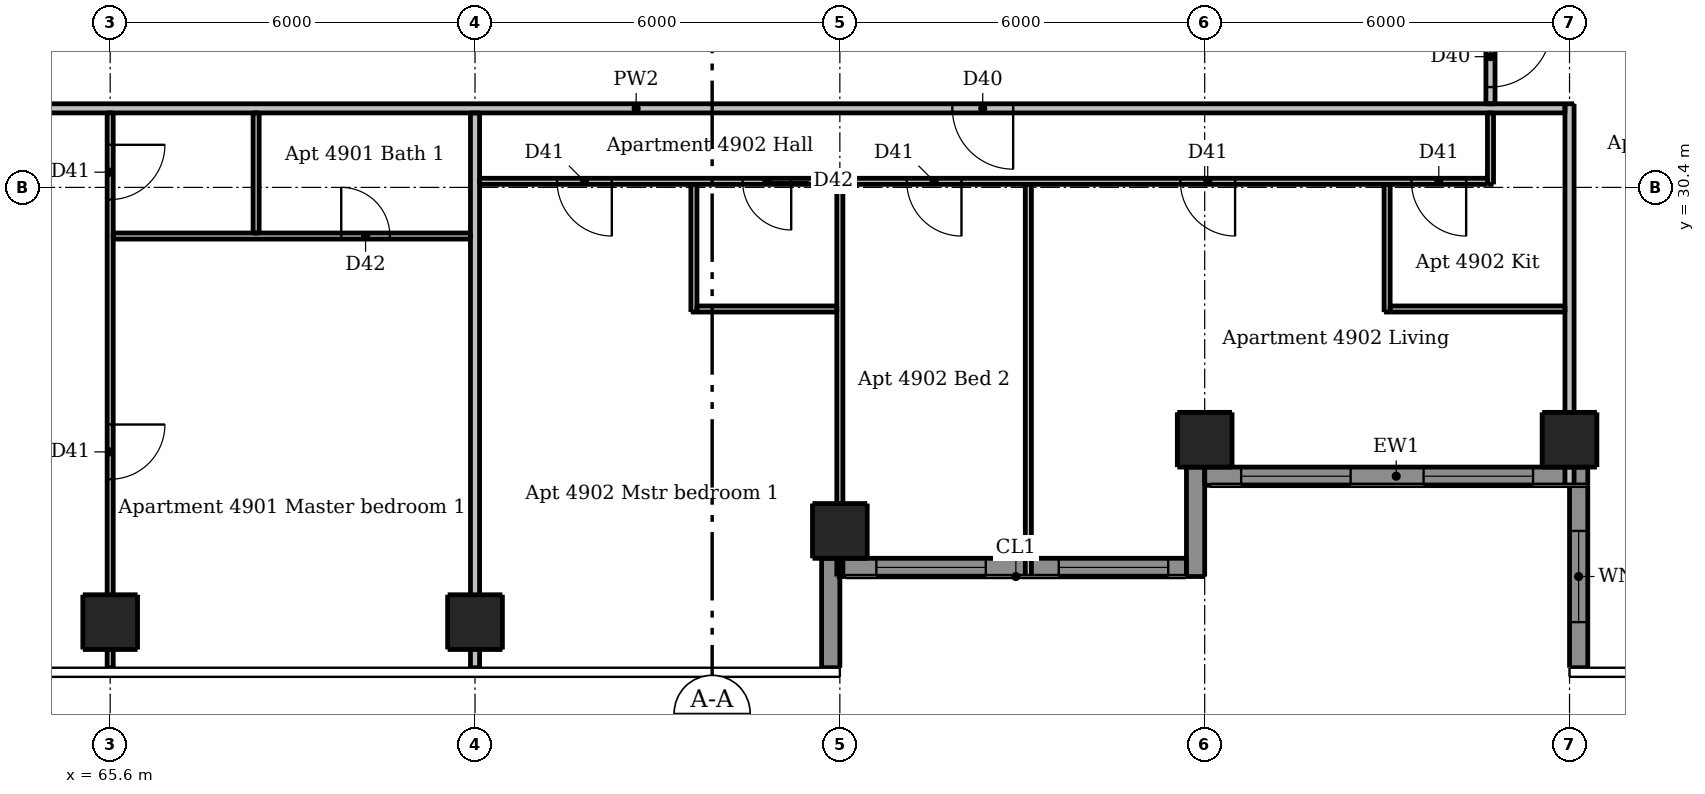
"""IFC4 building model, lengths in metres.
Left out: names, types, materials, properties, quantities, classifications, styles, units other than length and angle.
Written with IfcOpenShell. Run it as: python <this file> out.ifc"""

import sys

from ifc_helpers import new_model, si_unit, direction, frame, frame_2d, origin, origin_2d, place, context, subcontext, project, spatial, rectangle, extrude, element, fill, save


model = new_model("IFC4")
c1 = context("Model", 3, precision=1e-05, world=origin(), true_north=direction((0.0, 1.0)))
c2 = subcontext(c1, "Body", "Model", "MODEL_VIEW")
j1 = project(units=[si_unit("LENGTHUNIT", "METRE"), si_unit("PLANEANGLEUNIT", "RADIAN")], contexts=[c1])
p1 = place(None, origin())
s1 = spatial("IfcSite", under=j1, at=p1, CompositionType="ELEMENT")
p2 = place(p1, origin())
s2 = spatial("IfcBuilding", under=s1, at=p2, CompositionType="ELEMENT")
p3 = place(p2, frame((0.0, 0.0, 187.0)))
s3 = spatial("IfcBuildingStorey", under=s2, at=p3, CompositionType="ELEMENT", Elevation=187.0)
for number, where, z_axis, x_axis in (
    (1, (65.6, 23.25, 0.0), (0.0, 0.0, 1.0), (1.0, 0.0, 0.0)),
    (2, (71.6, 23.25, 0.0), (0.0, 0.0, 1.0), (1.0, 0.0, 0.0)),
    (3, (77.6, 24.75, 0.0), (0.0, 0.0, 1.0), (1.0, 0.0, 0.0)),
    (4, (83.6, 26.25, 0.0), (0.0, 0.0, 1.0), (1.0, 0.0, 0.0)),
    (5, (89.6, 26.25, 0.0), (0.0, 0.0, 1.0), (1.0, 0.0, 0.0)),
):
    element("IfcColumn", number, at=place(p3, frame(where, z_axis=z_axis, x_axis=x_axis)), inside=s3, PredefinedType="COLUMN", context=c2, shape_type="SweptSolid", body=[
        extrude(rectangle(XDim=0.9, YDim=0.9, at=origin_2d()), origin(), (0.0, 0.0, 1.0), 3.05),
    ])
for number, where, z_axis, x_axis in (
    (6, (77.45, 22.5, 0.0), (0.0, 0.0, 1.0), (0.0, 1.0, 0.0)),
    (7, (83.45, 24.0, 0.0), (0.0, 0.0, 1.0), (0.0, 1.0, 0.0)),
):
    element("IfcWall", number, at=place(p3, frame(where, z_axis=z_axis, x_axis=x_axis)), inside=s3, PredefinedType="SOLIDWALL", context=c2, shape_type="SweptSolid", body=[
        extrude(rectangle(XDim=1.8, YDim=0.3, at=frame_2d((0.9, 0.0))), origin(), (0.0, 0.0, 1.0), 3.05),
    ])
p4 = place(p3, frame((89.75, 25.5, 0.0), z_axis=(0.0, 0.0, 1.0), x_axis=(0.0, -1.0, 0.0)))
e8 = element("IfcWall", 8, at=p4, inside=s3, PredefinedType="SOLIDWALL", context=c2, shape_type="SweptSolid", body=[
    extrude(rectangle(XDim=3.0, YDim=0.3, at=frame_2d((1.5, 0.0))), origin(), (0.0, 0.0, 1.0), 3.05),
])
p5 = place(p4, frame((0.75, 0.0, 0.9)))
e9 = element("IfcOpeningElement", 9, at=p5, cuts=e8, PredefinedType="OPENING", context=c2, shape_type="SweptSolid", body=[
    extrude(rectangle(XDim=1.5, YDim=1.5, at=frame_2d((0.75, 0.75))), frame((0.0, 0.16, 0.0), z_axis=(0.0, -1.0, 0.0), x_axis=(1.0, 0.0, 0.0)), (0.0, 0.0, 1.0), 0.32),
])
p6 = place(p3, frame((77.6, 24.15, 0.0), z_axis=(0.0, 0.0, 1.0), x_axis=(1.0, 0.0, 0.0)))
e10 = element("IfcWall", 10, at=p6, inside=s3, PredefinedType="SOLIDWALL", context=c2, shape_type="SweptSolid", body=[
    extrude(rectangle(XDim=5.7, YDim=0.3, at=frame_2d((2.85, 0.0))), origin(), (0.0, 0.0, 1.0), 3.05),
])
p7 = place(p6, frame((0.6, 0.0, 0.15)))
e11 = element("IfcOpeningElement", 11, at=p7, cuts=e10, PredefinedType="OPENING", context=c2, shape_type="SweptSolid", body=[
    extrude(rectangle(XDim=1.8, YDim=2.1, at=frame_2d((0.9, 1.05))), frame((0.0, 0.16, 0.0), z_axis=(0.0, -1.0, 0.0), x_axis=(1.0, 0.0, 0.0)), (0.0, 0.0, 1.0), 0.32),
])
p8 = place(p6, frame((3.6, 0.0, 0.15)))
e12 = element("IfcOpeningElement", 12, at=p8, cuts=e10, PredefinedType="OPENING", context=c2, shape_type="SweptSolid", body=[
    extrude(rectangle(XDim=1.8, YDim=2.1, at=frame_2d((0.9, 1.05))), frame((0.0, 0.16, 0.0), z_axis=(0.0, -1.0, 0.0), x_axis=(1.0, 0.0, 0.0)), (0.0, 0.0, 1.0), 0.32),
])
p9 = place(p3, frame((83.6, 25.65, 0.0), z_axis=(0.0, 0.0, 1.0), x_axis=(1.0, 0.0, 0.0)))
e13 = element("IfcWall", 13, at=p9, inside=s3, PredefinedType="SOLIDWALL", context=c2, shape_type="SweptSolid", body=[
    extrude(rectangle(XDim=6.3, YDim=0.3, at=frame_2d((3.15, 0.0))), origin(), (0.0, 0.0, 1.0), 3.05),
])
p10 = place(p9, frame((0.6, 0.0, 0.15)))
e14 = element("IfcOpeningElement", 14, at=p10, cuts=e13, PredefinedType="OPENING", context=c2, shape_type="SweptSolid", body=[
    extrude(rectangle(XDim=1.8, YDim=2.1, at=frame_2d((0.9, 1.05))), frame((0.0, 0.16, 0.0), z_axis=(0.0, -1.0, 0.0), x_axis=(1.0, 0.0, 0.0)), (0.0, 0.0, 1.0), 0.32),
])
p11 = place(p9, frame((3.6, 0.0, 0.15)))
e15 = element("IfcOpeningElement", 15, at=p11, cuts=e13, PredefinedType="OPENING", context=c2, shape_type="SweptSolid", body=[
    extrude(rectangle(XDim=1.8, YDim=2.1, at=frame_2d((0.9, 1.05))), frame((0.0, 0.16, 0.0), z_axis=(0.0, -1.0, 0.0), x_axis=(1.0, 0.0, 0.0)), (0.0, 0.0, 1.0), 0.32),
])
p12 = place(p3, frame((65.6, 31.625, 0.0), z_axis=(0.0, 0.0, 1.0), x_axis=(0.0, -1.0, 0.0)))
e16 = element("IfcWall", 16, at=p12, inside=s3, PredefinedType="PARTITIONING", context=c2, shape_type="SweptSolid", body=[
    extrude(rectangle(XDim=9.125, YDim=0.1, at=frame_2d((4.562, 0.0))), origin(), (0.0, 0.0, 1.0), 2.516),
])
p13 = place(p12, frame((0.525, 0.0, 0.0)))
e17 = element("IfcOpeningElement", 17, at=p13, cuts=e16, PredefinedType="OPENING", context=c2, shape_type="SweptSolid", body=[
    extrude(rectangle(XDim=0.9, YDim=2.1, at=frame_2d((0.45, 1.05))), frame((0.0, 0.06, 0.0), z_axis=(0.0, -1.0, 0.0), x_axis=(1.0, 0.0, 0.0)), (0.0, 0.0, 1.0), 0.12),
])
p14 = place(p12, frame((5.125, 0.0, 0.0)))
e18 = element("IfcOpeningElement", 18, at=p14, cuts=e16, PredefinedType="OPENING", context=c2, shape_type="SweptSolid", body=[
    extrude(rectangle(XDim=0.9, YDim=2.1, at=frame_2d((0.45, 1.05))), frame((0.0, 0.06, 0.0), z_axis=(0.0, -1.0, 0.0), x_axis=(1.0, 0.0, 0.0)), (0.0, 0.0, 1.0), 0.12),
])
p15 = place(p3, frame((68.0, 29.65, 0.0), z_axis=(0.0, 0.0, 1.0), x_axis=(0.0, 1.0, 0.0)))
e19 = element("IfcWall", 19, at=p15, inside=s3, PredefinedType="PARTITIONING", context=c2, shape_type="SweptSolid", body=[
    extrude(rectangle(XDim=1.975, YDim=0.1, at=frame_2d((0.988, 0.0))), origin(), (0.0, 0.0, 1.0), 3.05),
])
p16 = place(p3, frame((75.2, 28.35, 0.0), z_axis=(0.0, 0.0, 1.0), x_axis=(0.0, 1.0, 0.0)))
e20 = element("IfcWall", 20, at=p16, inside=s3, PredefinedType="PARTITIONING", context=c2, shape_type="SweptSolid", body=[
    extrude(rectangle(XDim=2.1, YDim=0.1, at=frame_2d((1.05, 0.0))), origin(), (0.0, 0.0, 1.0), 3.05),
])
p17 = place(p3, frame((77.6, 24.0, 0.0), z_axis=(0.0, 0.0, 1.0), x_axis=(0.0, 1.0, 0.0)))
e21 = element("IfcWall", 21, at=p17, inside=s3, PredefinedType="PARTITIONING", context=c2, shape_type="SweptSolid", body=[
    extrude(rectangle(XDim=6.45, YDim=0.1, at=frame_2d((3.225, 0.0))), origin(), (0.0, 0.0, 1.0), 2.59),
])
p18 = place(p3, frame((80.7, 24.0, 0.0), z_axis=(0.0, 0.0, 1.0), x_axis=(0.0, 1.0, 0.0)))
e22 = element("IfcWall", 22, at=p18, inside=s3, PredefinedType="PARTITIONING", context=c2, shape_type="SweptSolid", body=[
    extrude(rectangle(XDim=6.45, YDim=0.1, at=frame_2d((3.225, 0.0))), origin(), (0.0, 0.0, 1.0), 3.05),
])
p19 = place(p3, frame((86.6, 28.35, 0.0), z_axis=(0.0, 0.0, 1.0), x_axis=(0.0, 1.0, 0.0)))
e23 = element("IfcWall", 23, at=p19, inside=s3, PredefinedType="PARTITIONING", context=c2, shape_type="SweptSolid", body=[
    extrude(rectangle(XDim=2.1, YDim=0.1, at=frame_2d((1.05, 0.0))), origin(), (0.0, 0.0, 1.0), 3.05),
])
p20 = place(p3, frame((88.3, 30.45, 0.0), z_axis=(0.0, 0.0, 1.0), x_axis=(0.0, 1.0, 0.0)))
e24 = element("IfcWall", 24, at=p20, inside=s3, PredefinedType="PARTITIONING", context=c2, shape_type="SweptSolid", body=[
    extrude(rectangle(XDim=1.175, YDim=0.1, at=frame_2d((0.587, 0.0))), origin(), (0.0, 0.0, 1.0), 3.05),
])
p21 = place(p3, frame((88.25, 30.5, 0.0), z_axis=(0.0, 0.0, 1.0), x_axis=(-1.0, 0.0, 0.0)))
e25 = element("IfcWall", 25, at=p21, inside=s3, PredefinedType="PARTITIONING", context=c2, shape_type="SweptSolid", body=[
    extrude(rectangle(XDim=16.575, YDim=0.1, at=frame_2d((8.288, 0.0))), origin(), (0.0, 0.0, 1.0), 3.05),
])
p22 = place(p21, frame((4.15, 0.0, 0.0)))
e26 = element("IfcOpeningElement", 26, at=p22, cuts=e25, PredefinedType="OPENING", context=c2, shape_type="SweptSolid", body=[
    extrude(rectangle(XDim=0.9, YDim=2.1, at=frame_2d((0.45, 1.05))), frame((0.0, 0.06, 0.0), z_axis=(0.0, -1.0, 0.0), x_axis=(1.0, 0.0, 0.0)), (0.0, 0.0, 1.0), 0.12),
])
p23 = place(p21, frame((0.35, 0.0, 0.0)))
e27 = element("IfcOpeningElement", 27, at=p23, cuts=e25, PredefinedType="OPENING", context=c2, shape_type="SweptSolid", body=[
    extrude(rectangle(XDim=0.9, YDim=2.1, at=frame_2d((0.45, 1.05))), frame((0.0, 0.06, 0.0), z_axis=(0.0, -1.0, 0.0), x_axis=(1.0, 0.0, 0.0)), (0.0, 0.0, 1.0), 0.12),
])
p24 = place(p21, frame((14.4, 0.0, 0.0)))
e28 = element("IfcOpeningElement", 28, at=p24, cuts=e25, PredefinedType="OPENING", context=c2, shape_type="SweptSolid", body=[
    extrude(rectangle(XDim=0.9, YDim=2.1, at=frame_2d((0.45, 1.05))), frame((0.0, 0.06, 0.0), z_axis=(0.0, -1.0, 0.0), x_axis=(1.0, 0.0, 0.0)), (0.0, 0.0, 1.0), 0.12),
])
p25 = place(p21, frame((8.65, 0.0, 0.0)))
e29 = element("IfcOpeningElement", 29, at=p25, cuts=e25, PredefinedType="OPENING", context=c2, shape_type="SweptSolid", body=[
    extrude(rectangle(XDim=0.9, YDim=2.1, at=frame_2d((0.45, 1.05))), frame((0.0, 0.06, 0.0), z_axis=(0.0, -1.0, 0.0), x_axis=(1.0, 0.0, 0.0)), (0.0, 0.0, 1.0), 0.12),
])
p26 = place(p21, frame((11.45, 0.0, 0.0)))
e30 = element("IfcOpeningElement", 30, at=p26, cuts=e25, PredefinedType="OPENING", context=c2, shape_type="SweptSolid", body=[
    extrude(rectangle(XDim=0.8, YDim=2.1, at=frame_2d((0.4, 1.05))), frame((0.0, 0.06, 0.0), z_axis=(0.0, -1.0, 0.0), x_axis=(1.0, 0.0, 0.0)), (0.0, 0.0, 1.0), 0.12),
])
p27 = place(p3, frame((65.65, 29.6, 0.0), z_axis=(0.0, 0.0, 1.0), x_axis=(1.0, 0.0, 0.0)))
e31 = element("IfcWall", 31, at=p27, inside=s3, PredefinedType="PARTITIONING", context=c2, shape_type="SweptSolid", body=[
    extrude(rectangle(XDim=5.875, YDim=0.1, at=frame_2d((2.938, 0.0))), origin(), (0.0, 0.0, 1.0), 3.05),
])
p28 = place(p27, frame((3.75, 0.0, 0.0)))
e32 = element("IfcOpeningElement", 32, at=p28, cuts=e31, PredefinedType="OPENING", context=c2, shape_type="SweptSolid", body=[
    extrude(rectangle(XDim=0.8, YDim=2.1, at=frame_2d((0.4, 1.05))), frame((0.0, 0.06, 0.0), z_axis=(0.0, -1.0, 0.0), x_axis=(1.0, 0.0, 0.0)), (0.0, 0.0, 1.0), 0.12),
])
p29 = place(p3, frame((75.25, 28.4, 0.0), z_axis=(0.0, 0.0, 1.0), x_axis=(1.0, 0.0, 0.0)))
e33 = element("IfcWall", 33, at=p29, inside=s3, PredefinedType="PARTITIONING", context=c2, shape_type="SweptSolid", body=[
    extrude(rectangle(XDim=2.3, YDim=0.1, at=frame_2d((1.15, 0.0))), origin(), (0.0, 0.0, 1.0), 3.05),
])
p30 = place(p3, frame((86.65, 28.4, 0.0), z_axis=(0.0, 0.0, 1.0), x_axis=(1.0, 0.0, 0.0)))
e34 = element("IfcWall", 34, at=p30, inside=s3, PredefinedType="PARTITIONING", context=c2, shape_type="SweptSolid", body=[
    extrude(rectangle(XDim=2.875, YDim=0.1, at=frame_2d((1.438, 0.0))), origin(), (0.0, 0.0, 1.0), 3.05),
])
p31 = place(p3, frame((71.6, 22.5, 0.0), z_axis=(0.0, 0.0, 1.0), x_axis=(0.0, 1.0, 0.0)))
e35 = element("IfcWall", 35, at=p31, inside=s3, PredefinedType="PARTITIONING", context=c2, shape_type="SweptSolid", body=[
    extrude(rectangle(XDim=9.125, YDim=0.15, at=frame_2d((4.562, 0.0))), origin(), (0.0, 0.0, 1.0), 2.516),
])
p32 = place(p3, frame((88.3, 61.175, 0.0), z_axis=(0.0, 0.0, 1.0), x_axis=(0.0, -1.0, 0.0)))
e36 = element("IfcWall", 36, at=p32, inside=s3, PredefinedType="PARTITIONING", context=c2, shape_type="SweptSolid", body=[
    extrude(rectangle(XDim=29.4, YDim=0.15, at=frame_2d((14.7, 0.0))), origin(), (0.0, 0.0, 1.0), 3.05),
])
p33 = place(p32, frame((28.125, 0.0, 0.0)))
e37 = element("IfcOpeningElement", 37, at=p33, cuts=e36, PredefinedType="OPENING", context=c2, shape_type="SweptSolid", body=[
    extrude(rectangle(XDim=1.0, YDim=2.1, at=frame_2d((0.5, 1.05))), frame((0.0, 0.085, 0.0), z_axis=(0.0, -1.0, 0.0), x_axis=(1.0, 0.0, 0.0)), (0.0, 0.0, 1.0), 0.17),
])
p34 = place(p32, frame((10.725, 0.0, 0.0)))
e38 = element("IfcOpeningElement", 38, at=p34, cuts=e36, PredefinedType="OPENING", context=c2, shape_type="SweptSolid", body=[
    extrude(rectangle(XDim=1.0, YDim=2.1, at=frame_2d((0.5, 1.05))), frame((0.0, 0.085, 0.0), z_axis=(0.0, -1.0, 0.0), x_axis=(1.0, 0.0, 0.0)), (0.0, 0.0, 1.0), 0.17),
])
p35 = place(p3, frame((89.6, 25.5, 0.0), z_axis=(0.0, 0.0, 1.0), x_axis=(0.0, 1.0, 0.0)))
e39 = element("IfcWall", 39, at=p35, inside=s3, PredefinedType="PARTITIONING", context=c2, shape_type="SweptSolid", body=[
    extrude(rectangle(XDim=6.275, YDim=0.15, at=frame_2d((3.137, 0.0))), origin(), (0.0, 0.0, 1.0), 2.516),
])
p36 = place(p3, frame((89.525, 31.7, 0.0), z_axis=(0.0, 0.0, 1.0), x_axis=(-1.0, 0.0, 0.0)))
e40 = element("IfcWall", 40, at=p36, inside=s3, PredefinedType="PARTITIONING", context=c2, shape_type="SweptSolid", body=[
    extrude(rectangle(XDim=30.55, YDim=0.15, at=frame_2d((15.275, 0.0))), origin(), (0.0, 0.0, 1.0), 3.05),
])
p37 = place(p36, frame((26.775, 0.0, 0.0)))
e41 = element("IfcOpeningElement", 41, at=p37, cuts=e40, PredefinedType="OPENING", context=c2, shape_type="SweptSolid", body=[
    extrude(rectangle(XDim=1.0, YDim=2.1, at=frame_2d((0.5, 1.05))), frame((0.0, 0.085, 0.0), z_axis=(0.0, -1.0, 0.0), x_axis=(1.0, 0.0, 0.0)), (0.0, 0.0, 1.0), 0.17),
])
p38 = place(p36, frame((9.075, 0.0, 0.0)))
e42 = element("IfcOpeningElement", 42, at=p38, cuts=e40, PredefinedType="OPENING", context=c2, shape_type="SweptSolid", body=[
    extrude(rectangle(XDim=1.0, YDim=2.1, at=frame_2d((0.5, 1.05))), frame((0.0, 0.085, 0.0), z_axis=(0.0, -1.0, 0.0), x_axis=(1.0, 0.0, 0.0)), (0.0, 0.0, 1.0), 0.17),
])
p39 = place(p5, origin())
e43 = element("IfcWindow", 43, at=p39, inside=s3, PartitioningType="DOUBLE_PANEL_VERTICAL", PredefinedType="WINDOW", context=c2, shape_type="SweptSolid", body=[
    extrude(rectangle(XDim=1.5, YDim=1.5, at=frame_2d((0.75, 0.75))), frame((0.0, 0.03, 0.0), z_axis=(0.0, -1.0, 0.0), x_axis=(1.0, 0.0, 0.0)), (0.0, 0.0, 1.0), 0.06),
])
fill(e9, e43)
p40 = place(p7, origin())
e44 = element("IfcWindow", 44, at=p40, inside=s3, PartitioningType="DOUBLE_PANEL_VERTICAL", PredefinedType="WINDOW", context=c2, shape_type="SweptSolid", body=[
    extrude(rectangle(XDim=1.8, YDim=2.1, at=frame_2d((0.9, 1.05))), frame((0.0, 0.03, 0.0), z_axis=(0.0, -1.0, 0.0), x_axis=(1.0, 0.0, 0.0)), (0.0, 0.0, 1.0), 0.06),
])
fill(e11, e44)
p41 = place(p8, origin())
e45 = element("IfcWindow", 45, at=p41, inside=s3, PartitioningType="DOUBLE_PANEL_VERTICAL", PredefinedType="WINDOW", context=c2, shape_type="SweptSolid", body=[
    extrude(rectangle(XDim=1.8, YDim=2.1, at=frame_2d((0.9, 1.05))), frame((0.0, 0.03, 0.0), z_axis=(0.0, -1.0, 0.0), x_axis=(1.0, 0.0, 0.0)), (0.0, 0.0, 1.0), 0.06),
])
fill(e12, e45)
p42 = place(p10, origin())
e46 = element("IfcWindow", 46, at=p42, inside=s3, PartitioningType="DOUBLE_PANEL_VERTICAL", PredefinedType="WINDOW", context=c2, shape_type="SweptSolid", body=[
    extrude(rectangle(XDim=1.8, YDim=2.1, at=frame_2d((0.9, 1.05))), frame((0.0, 0.03, 0.0), z_axis=(0.0, -1.0, 0.0), x_axis=(1.0, 0.0, 0.0)), (0.0, 0.0, 1.0), 0.06),
])
fill(e14, e46)
p43 = place(p11, origin())
e47 = element("IfcWindow", 47, at=p43, inside=s3, PartitioningType="DOUBLE_PANEL_VERTICAL", PredefinedType="WINDOW", context=c2, shape_type="SweptSolid", body=[
    extrude(rectangle(XDim=1.8, YDim=2.1, at=frame_2d((0.9, 1.05))), frame((0.0, 0.03, 0.0), z_axis=(0.0, -1.0, 0.0), x_axis=(1.0, 0.0, 0.0)), (0.0, 0.0, 1.0), 0.06),
])
fill(e15, e47)
p44 = place(p13, origin())
e48 = element("IfcDoor", 48, at=p44, inside=s3, OperationType="SINGLE_SWING_LEFT", PredefinedType="DOOR", context=c2, shape_type="SweptSolid", body=[
    extrude(rectangle(XDim=0.9, YDim=2.1, at=frame_2d((0.45, 1.05))), frame((0.0, 0.025, 0.0), z_axis=(0.0, -1.0, 0.0), x_axis=(1.0, 0.0, 0.0)), (0.0, 0.0, 1.0), 0.05),
])
fill(e17, e48)
p45 = place(p14, origin())
e49 = element("IfcDoor", 49, at=p45, inside=s3, OperationType="SINGLE_SWING_LEFT", PredefinedType="DOOR", context=c2, shape_type="SweptSolid", body=[
    extrude(rectangle(XDim=0.9, YDim=2.1, at=frame_2d((0.45, 1.05))), frame((0.0, 0.025, 0.0), z_axis=(0.0, -1.0, 0.0), x_axis=(1.0, 0.0, 0.0)), (0.0, 0.0, 1.0), 0.05),
])
fill(e18, e49)
p46 = place(p28, origin())
e50 = element("IfcDoor", 50, at=p46, inside=s3, OperationType="SINGLE_SWING_LEFT", PredefinedType="DOOR", context=c2, shape_type="SweptSolid", body=[
    extrude(rectangle(XDim=0.8, YDim=2.1, at=frame_2d((0.4, 1.05))), frame((0.0, 0.025, 0.0), z_axis=(0.0, -1.0, 0.0), x_axis=(1.0, 0.0, 0.0)), (0.0, 0.0, 1.0), 0.05),
])
fill(e32, e50)
p47 = place(p38, origin())
e51 = element("IfcDoor", 51, at=p47, inside=s3, OperationType="SINGLE_SWING_LEFT", PredefinedType="DOOR", context=c2, shape_type="SweptSolid", body=[
    extrude(rectangle(XDim=1.0, YDim=2.1, at=frame_2d((0.5, 1.05))), frame((0.0, 0.025, 0.0), z_axis=(0.0, -1.0, 0.0), x_axis=(1.0, 0.0, 0.0)), (0.0, 0.0, 1.0), 0.05),
])
fill(e42, e51)
p48 = place(p22, origin())
e52 = element("IfcDoor", 52, at=p48, inside=s3, OperationType="SINGLE_SWING_LEFT", PredefinedType="DOOR", context=c2, shape_type="SweptSolid", body=[
    extrude(rectangle(XDim=0.9, YDim=2.1, at=frame_2d((0.45, 1.05))), frame((0.0, 0.025, 0.0), z_axis=(0.0, -1.0, 0.0), x_axis=(1.0, 0.0, 0.0)), (0.0, 0.0, 1.0), 0.05),
])
fill(e26, e52)
p49 = place(p23, origin())
e53 = element("IfcDoor", 53, at=p49, inside=s3, OperationType="SINGLE_SWING_LEFT", PredefinedType="DOOR", context=c2, shape_type="SweptSolid", body=[
    extrude(rectangle(XDim=0.9, YDim=2.1, at=frame_2d((0.45, 1.05))), frame((0.0, 0.025, 0.0), z_axis=(0.0, -1.0, 0.0), x_axis=(1.0, 0.0, 0.0)), (0.0, 0.0, 1.0), 0.05),
])
fill(e27, e53)
p50 = place(p24, origin())
e54 = element("IfcDoor", 54, at=p50, inside=s3, OperationType="SINGLE_SWING_LEFT", PredefinedType="DOOR", context=c2, shape_type="SweptSolid", body=[
    extrude(rectangle(XDim=0.9, YDim=2.1, at=frame_2d((0.45, 1.05))), frame((0.0, 0.025, 0.0), z_axis=(0.0, -1.0, 0.0), x_axis=(1.0, 0.0, 0.0)), (0.0, 0.0, 1.0), 0.05),
])
fill(e28, e54)
p51 = place(p25, origin())
e55 = element("IfcDoor", 55, at=p51, inside=s3, OperationType="SINGLE_SWING_LEFT", PredefinedType="DOOR", context=c2, shape_type="SweptSolid", body=[
    extrude(rectangle(XDim=0.9, YDim=2.1, at=frame_2d((0.45, 1.05))), frame((0.0, 0.025, 0.0), z_axis=(0.0, -1.0, 0.0), x_axis=(1.0, 0.0, 0.0)), (0.0, 0.0, 1.0), 0.05),
])
fill(e29, e55)
p52 = place(p26, origin())
e56 = element("IfcDoor", 56, at=p52, inside=s3, OperationType="SINGLE_SWING_LEFT", PredefinedType="DOOR", context=c2, shape_type="SweptSolid", body=[
    extrude(rectangle(XDim=0.8, YDim=2.1, at=frame_2d((0.4, 1.05))), frame((0.0, 0.025, 0.0), z_axis=(0.0, -1.0, 0.0), x_axis=(1.0, 0.0, 0.0)), (0.0, 0.0, 1.0), 0.05),
])
fill(e30, e56)
p53 = place(p33, origin())
e57 = element("IfcDoor", 57, at=p53, inside=s3, OperationType="SINGLE_SWING_LEFT", PredefinedType="DOOR", context=c2, shape_type="SweptSolid", body=[
    extrude(rectangle(XDim=1.0, YDim=2.1, at=frame_2d((0.5, 1.05))), frame((0.0, 0.025, 0.0), z_axis=(0.0, -1.0, 0.0), x_axis=(1.0, 0.0, 0.0)), (0.0, 0.0, 1.0), 0.05),
])
fill(e37, e57)
save(model, sys.argv[1])
